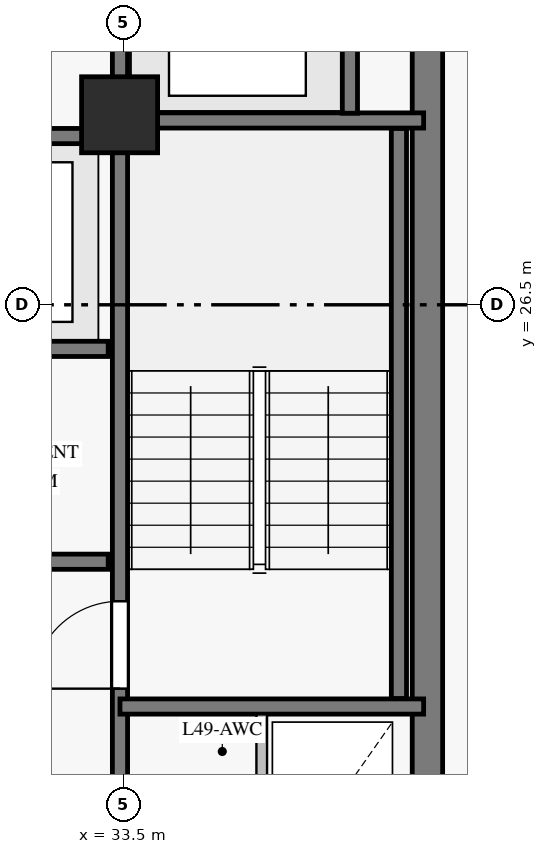
"""IFC4 building model, lengths in metres.
Left out: names, types, materials, properties, quantities, classifications, styles, units other than length and angle.
Written with IfcOpenShell. Run it as: python <this file> out.ifc"""

import sys

from ifc_helpers import new_model, si_unit, direction, frame, frame_2d, origin, origin_with_axes, origin_2d, place, context, subcontext, project, spatial, rectangle, extrude, source, transform, mapped, element, fill, save


model = new_model("IFC4")
c1 = context("Model", 3, precision=1e-05, world=origin(), true_north=direction((0.0, 1.0)))
c2 = subcontext(c1, "Body", "Model", "MODEL_VIEW")
j1 = project(units=[si_unit("LENGTHUNIT", "METRE"), si_unit("PLANEANGLEUNIT", "RADIAN")], contexts=[c1])
p1 = place(None, origin())
s1 = spatial("IfcSite", under=j1, at=p1, CompositionType="ELEMENT")
p2 = place(p1, origin())
s2 = spatial("IfcBuilding", under=s1, at=p2, CompositionType="ELEMENT")
p3 = place(p2, frame((0.0, 0.0, 171.8)))
s3 = spatial("IfcBuildingStorey", under=s2, at=p3, CompositionType="ELEMENT", Elevation=171.8)
p4 = place(p3, frame((37.5, 18.3, 0.0), z_axis=(0.0, 0.0, 1.0), x_axis=(0.0, 1.0, 0.0)))
e1 = element("IfcWall", 1, at=p4, inside=s3, PredefinedType="SHEAR", context=c2, shape_type="SweptSolid", body=[
    extrude(rectangle(XDim=16.4, YDim=0.4, at=frame_2d((8.2, 0.0))), origin(), (0.0, 0.0, 1.0), 2.825),
])
p5 = place(p4, frame((14.15, 0.0, 0.0)))
e2 = element("IfcOpeningElement", 2, at=p5, cuts=e1, PredefinedType="OPENING", context=c2, shape_type="SweptSolid", body=[
    extrude(rectangle(XDim=1.2, YDim=2.15, at=frame_2d((0.6, 1.075))), frame((0.0, 0.21, 0.0), z_axis=(0.0, -1.0, 0.0), x_axis=(1.0, 0.0, 0.0)), (0.0, 0.0, 1.0), 0.42),
])
m1 = source(origin_with_axes(), c2, "Body", "SweptSolid", [
    extrude(rectangle(XDim=1.0, YDim=1.0, at=origin_2d()), origin(), (0.0, 0.0, 1.0), 3.05),
])
p6 = place(p3, frame((33.45, 29.0, 0.0), z_axis=(0.0, 0.0, 1.0), x_axis=(1.0, 0.0, 0.0)))
e3 = element("IfcColumn", 3, at=p6, inside=s3, PredefinedType="COLUMN", context=c2, shape_type="MappedRepresentation", body=[
    mapped(m1, transform((0.0, 0.0, 0.0), scale=1.0)),
])
p7 = place(p3, frame((33.455, 18.7, 0.0), z_axis=(0.0, 0.0, 1.0), x_axis=(0.0, 1.0, 0.0)))
e4 = element("IfcWall", 4, at=p7, inside=s3, PredefinedType="SHEAR", context=c2, shape_type="SweptSolid", body=[
    extrude(rectangle(XDim=15.6, YDim=0.2, at=frame_2d((7.8, 0.0))), origin(), (0.0, 0.0, 1.0), 2.825),
])
p8 = place(p7, frame((2.75, 0.0, 0.0)))
e5 = element("IfcOpeningElement", 5, at=p8, cuts=e4, PredefinedType="OPENING", context=c2, shape_type="SweptSolid", body=[
    extrude(rectangle(XDim=1.15, YDim=2.15, at=frame_2d((0.575, 1.075))), frame((0.0, 0.11, 0.0), z_axis=(0.0, -1.0, 0.0), x_axis=(1.0, 0.0, 0.0)), (0.0, 0.0, 1.0), 0.22),
])
p9 = place(p7, frame((0.55, 0.0, 0.0)))
e6 = element("IfcOpeningElement", 6, at=p9, cuts=e4, PredefinedType="OPENING", context=c2, shape_type="SweptSolid", body=[
    extrude(rectangle(XDim=0.94, YDim=2.1, at=frame_2d((0.47, 1.05))), frame((0.0, 0.11, 0.0), z_axis=(0.0, -1.0, 0.0), x_axis=(1.0, 0.0, 0.0)), (0.0, 0.0, 1.0), 0.22),
])
p10 = place(p3, frame((23.7, 23.12, 0.0), z_axis=(0.0, 0.0, 1.0), x_axis=(1.0, 0.0, 0.0)))
e7 = element("IfcWall", 7, at=p10, inside=s3, PredefinedType="SHEAR", context=c2, shape_type="SweptSolid", body=[
    extrude(rectangle(XDim=9.6, YDim=0.2, at=frame_2d((4.8, 0.0))), origin(), (0.0, 0.0, 1.0), 2.825),
])
p11 = place(p10, frame((1.1, 0.0, 0.0)))
e8 = element("IfcOpeningElement", 8, at=p11, cuts=e7, PredefinedType="OPENING", context=c2, shape_type="SweptSolid", body=[
    extrude(rectangle(XDim=0.92, YDim=2.1, at=frame_2d((0.46, 1.05))), frame((0.0, 0.11, 0.0), z_axis=(0.0, -1.0, 0.0), x_axis=(1.0, 0.0, 0.0)), (0.0, 0.0, 1.0), 0.22),
])
p12 = place(p10, frame((5.2, 0.0, 0.0)))
e9 = element("IfcOpeningElement", 9, at=p12, cuts=e7, PredefinedType="OPENING", context=c2, shape_type="SweptSolid", body=[
    extrude(rectangle(XDim=1.0, YDim=2.15, at=frame_2d((0.5, 1.075))), frame((0.0, 0.11, 0.0), z_axis=(0.0, -1.0, 0.0), x_axis=(1.0, 0.0, 0.0)), (0.0, 0.0, 1.0), 0.22),
])
p13 = place(p3, frame((23.7, 25.92, 0.0), z_axis=(0.0, 0.0, 1.0), x_axis=(1.0, 0.0, 0.0)))
e10 = element("IfcWall", 10, at=p13, inside=s3, PredefinedType="SHEAR", context=c2, shape_type="SweptSolid", body=[
    extrude(rectangle(XDim=9.6, YDim=0.2, at=frame_2d((4.8, 0.0))), origin(), (0.0, 0.0, 1.0), 2.825),
])
p14 = place(p3, frame((23.7, 28.72, 0.0), z_axis=(0.0, 0.0, 1.0), x_axis=(1.0, 0.0, 0.0)))
e11 = element("IfcWall", 11, at=p14, inside=s3, PredefinedType="SHEAR", context=c2, shape_type="SweptSolid", body=[
    extrude(rectangle(XDim=9.6, YDim=0.2, at=frame_2d((4.8, 0.0))), origin(), (0.0, 0.0, 1.0), 2.825),
])
p15 = place(p14, frame((0.6, 0.0, 0.0)))
e12 = element("IfcOpeningElement", 12, at=p15, cuts=e11, PredefinedType="OPENING", context=c2, shape_type="SweptSolid", body=[
    extrude(rectangle(XDim=1.1, YDim=2.15, at=frame_2d((0.55, 1.075))), frame((0.0, 0.11, 0.0), z_axis=(0.0, -1.0, 0.0), x_axis=(1.0, 0.0, 0.0)), (0.0, 0.0, 1.0), 0.22),
])
p16 = place(p14, frame((2.98, 0.0, 0.0)))
e13 = element("IfcOpeningElement", 13, at=p16, cuts=e11, PredefinedType="OPENING", context=c2, shape_type="SweptSolid", body=[
    extrude(rectangle(XDim=1.1, YDim=2.15, at=frame_2d((0.55, 1.075))), frame((0.0, 0.11, 0.0), z_axis=(0.0, -1.0, 0.0), x_axis=(1.0, 0.0, 0.0)), (0.0, 0.0, 1.0), 0.22),
])
p17 = place(p14, frame((5.36, 0.0, 0.0)))
e14 = element("IfcOpeningElement", 14, at=p17, cuts=e11, PredefinedType="OPENING", context=c2, shape_type="SweptSolid", body=[
    extrude(rectangle(XDim=1.1, YDim=2.15, at=frame_2d((0.55, 1.075))), frame((0.0, 0.11, 0.0), z_axis=(0.0, -1.0, 0.0), x_axis=(1.0, 0.0, 0.0)), (0.0, 0.0, 1.0), 0.22),
])
p18 = place(p14, frame((7.74, 0.0, 0.0)))
e15 = element("IfcOpeningElement", 15, at=p18, cuts=e11, PredefinedType="OPENING", context=c2, shape_type="SweptSolid", body=[
    extrude(rectangle(XDim=1.1, YDim=2.15, at=frame_2d((0.55, 1.075))), frame((0.0, 0.11, 0.0), z_axis=(0.0, -1.0, 0.0), x_axis=(1.0, 0.0, 0.0)), (0.0, 0.0, 1.0), 0.22),
])
p19 = place(p3, frame((37.125, 21.32, 0.0), z_axis=(0.0, 0.0, 1.0), x_axis=(0.0, 1.0, 0.0)))
e16 = element("IfcWall", 16, at=p19, inside=s3, PredefinedType="SHEAR", context=c2, shape_type="SweptSolid", body=[
    extrude(rectangle(XDim=7.5, YDim=0.2, at=frame_2d((3.75, 0.0))), origin(), (0.0, 0.0, 1.0), 2.825),
])
for number, where, z_axis, x_axis in (
    (17, (33.455, 21.215, 0.0), (0.0, 0.0, 1.0), (1.0, 0.0, 0.0)),
    (18, (33.455, 28.925, 0.0), (0.0, 0.0, 1.0), (1.0, 0.0, 0.0)),
):
    element("IfcWall", number, at=place(p3, frame(where, z_axis=z_axis, x_axis=x_axis)), inside=s3, PredefinedType="SHEAR", context=c2, shape_type="SweptSolid", body=[
        extrude(rectangle(XDim=3.995, YDim=0.2, at=frame_2d((1.998, 0.0))), origin(), (0.0, 0.0, 1.0), 2.825),
    ])
p20 = place(p3, frame((36.48, 29.02, 0.0), z_axis=(0.0, 0.0, 1.0), x_axis=(0.0, 1.0, 0.0)))
e19 = element("IfcWall", 19, at=p20, inside=s3, PredefinedType="SHEAR", context=c2, shape_type="SweptSolid", body=[
    extrude(rectangle(XDim=2.86, YDim=0.2, at=frame_2d((1.43, 0.0))), origin(), (0.0, 0.0, 1.0), 2.825),
])
p21 = place(p3, frame((35.32, 18.507, 0.0), z_axis=(0.0, 0.0, 1.0), x_axis=(0.0, 1.0, 0.0)))
e20 = element("IfcWall", 20, at=p21, inside=s3, PredefinedType="PARTITIONING", context=c2, shape_type="SweptSolid", body=[
    extrude(rectangle(XDim=2.604, YDim=0.14, at=frame_2d((1.302, 0.0))), origin(), (0.0, 0.0, 1.0), 2.825),
])
m2 = source(origin_with_axes(), c2, "Body", "SweptSolid", [
    extrude(rectangle(XDim=1.15, YDim=2.15, at=frame_2d((0.575, 1.075))), frame((0.0, 0.025, 0.0), z_axis=(0.0, -1.0, 0.0), x_axis=(1.0, 0.0, 0.0)), (0.0, 0.0, 1.0), 0.05),
])
p22 = place(p8, origin())
e21 = element("IfcDoor", 21, at=p22, inside=s3, OperationType="SINGLE_SWING_LEFT", PredefinedType="DOOR", context=c2, shape_type="MappedRepresentation", body=[
    mapped(m2, transform((0.0, 0.0, 0.0), scale=1.0)),
])
fill(e5, e21)
save(model, sys.argv[1])
